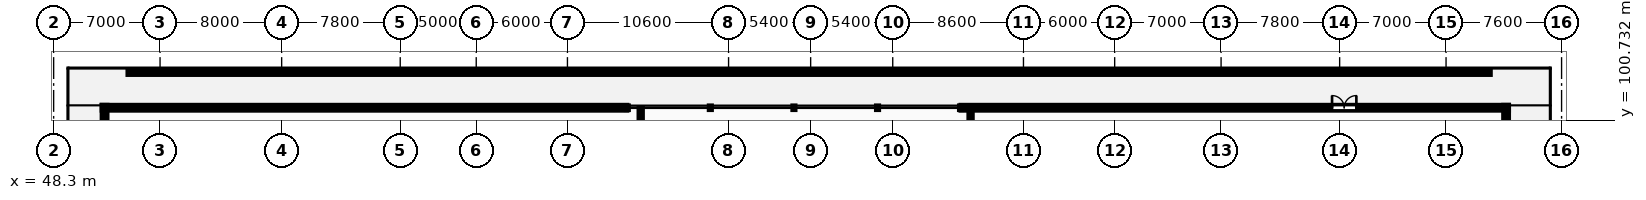
"""IFC4 building model, lengths in metres.
Left out: names, types, materials, properties, quantities, classifications, styles, units other than length and angle.
Written with IfcOpenShell. Run it as: python <this file> out.ifc"""

import sys

from ifc_helpers import new_model, si_unit, direction, frame, frame_2d, origin, place, context, subcontext, project, spatial, rectangle, extrude, element, fill, save


model = new_model("IFC4")
c1 = context("Model", 3, precision=1e-05, world=origin(), true_north=direction((0.0, 1.0)))
c2 = subcontext(c1, "Body", "Model", "MODEL_VIEW")
j1 = project(units=[si_unit("LENGTHUNIT", "METRE"), si_unit("PLANEANGLEUNIT", "RADIAN")], contexts=[c1])
p1 = place(None, origin())
s1 = spatial("IfcSite", under=j1, at=p1, CompositionType="ELEMENT")
p2 = place(p1, origin())
s2 = spatial("IfcBuilding", under=s1, at=p2, CompositionType="ELEMENT")
p3 = place(p2, frame((0.0, 0.0, 14.5)))
s3 = spatial("IfcBuildingStorey", under=s2, at=p3, CompositionType="ELEMENT", Elevation=14.5)
p4 = place(p3, frame((144.0, 101.55, 0.0), z_axis=(0.0, 0.0, 1.0), x_axis=(-1.0, 0.0, 0.0)))
e1 = element("IfcWall", 1, at=p4, inside=s3, PredefinedType="STANDARD", context=c2, shape_type="SweptSolid", body=[
    extrude(rectangle(XDim=36.0, YDim=0.3, at=frame_2d((18.0, 0.0))), origin(), (0.0, 0.0, 1.0), 4.18),
])
p5 = place(p4, frame((10.0, 0.0, 0.0)))
e2 = element("IfcOpeningElement", 2, at=p5, cuts=e1, PredefinedType="OPENING", context=c2, shape_type="SweptSolid", body=[
    extrude(rectangle(XDim=1.6, YDim=2.2, at=frame_2d((0.8, 1.1))), frame((0.0, 0.16, 0.0), z_axis=(0.0, -1.0, 0.0), x_axis=(1.0, 0.0, 0.0)), (0.0, 0.0, 1.0), 0.32),
])
p6 = place(p3, frame((86.0, 101.55, 0.0), z_axis=(0.0, 0.0, 1.0), x_axis=(-1.0, 0.0, 0.0)))
e3 = element("IfcWall", 3, at=p6, inside=s3, PredefinedType="STANDARD", context=c2, shape_type="SweptSolid", body=[
    extrude(rectangle(XDim=34.5, YDim=0.3, at=frame_2d((17.25, 0.0))), origin(), (0.0, 0.0, 1.0), 4.18),
])
p7 = place(p3, frame((51.65, 101.7, 0.0), z_axis=(0.0, 0.0, 1.0), x_axis=(0.0, -1.0, 0.0)))
e4 = element("IfcWall", 4, at=p7, inside=s3, PredefinedType="STANDARD", context=c2, shape_type="SweptSolid", body=[
    extrude(rectangle(XDim=119.7, YDim=0.3, at=frame_2d((59.85, 0.0))), origin(), (0.0, 0.0, 1.0), 4.18),
])
p8 = place(p7, frame((12.0, 0.0, 0.0)))
e5 = element("IfcOpeningElement", 5, at=p8, cuts=e4, PredefinedType="OPENING", context=c2, shape_type="SweptSolid", body=[
    extrude(rectangle(XDim=1.6, YDim=2.2, at=frame_2d((0.8, 1.1))), frame((0.0, 0.16, 0.0), z_axis=(0.0, -1.0, 0.0), x_axis=(1.0, 0.0, 0.0)), (0.0, 0.0, 1.0), 0.32),
])
p9 = place(p3, frame((143.85, -18.0, 0.0), z_axis=(0.0, 0.0, 1.0), x_axis=(0.0, 1.0, 0.0)))
e6 = element("IfcWall", 6, at=p9, inside=s3, PredefinedType="STANDARD", context=c2, shape_type="SweptSolid", body=[
    extrude(rectangle(XDim=119.7, YDim=0.3, at=frame_2d((59.85, 0.0))), origin(), (0.0, 0.0, 1.0), 4.18),
])
p10 = place(p9, frame((20.0, 0.0, 0.0)))
e7 = element("IfcOpeningElement", 7, at=p10, cuts=e6, PredefinedType="OPENING", context=c2, shape_type="SweptSolid", body=[
    extrude(rectangle(XDim=1.6, YDim=2.2, at=frame_2d((0.8, 1.1))), frame((0.0, 0.16, 0.0), z_axis=(0.0, -1.0, 0.0), x_axis=(1.0, 0.0, 0.0)), (0.0, 0.0, 1.0), 0.32),
])
p11 = place(p3, frame((142.8, 103.85, 0.0), z_axis=(0.0, 0.0, 1.0), x_axis=(-1.0, 0.0, 0.0)))
e8 = element("IfcWall", 8, at=p11, inside=s3, PredefinedType="PARAPET", context=c2, shape_type="SweptSolid", body=[
    extrude(rectangle(XDim=89.6, YDim=0.2, at=frame_2d((44.8, 0.0))), origin(), (0.0, 0.0, 1.0), 0.65),
])
p12 = place(p3, frame((86.92, 67.4, 0.0), z_axis=(0.0, 0.0, 1.0), x_axis=(0.0, 1.0, 0.0)))
e9 = element("IfcWall", 9, at=p12, inside=s3, PredefinedType="PARTITIONING", context=c2, shape_type="SweptSolid", body=[
    extrude(rectangle(XDim=34.12, YDim=0.2, at=frame_2d((17.06, 0.0))), origin(), (0.0, 0.0, 1.0), 4.18),
])
p13 = place(p12, frame((8.65, 0.0, 0.0)))
e10 = element("IfcOpeningElement", 10, at=p13, cuts=e9, PredefinedType="OPENING", context=c2, shape_type="SweptSolid", body=[
    extrude(rectangle(XDim=1.22, YDim=2.18, at=frame_2d((0.61, 1.09))), frame((0.0, 0.11, 0.0), z_axis=(0.0, -1.0, 0.0), x_axis=(1.0, 0.0, 0.0)), (0.0, 0.0, 1.0), 0.22),
])
p14 = place(p3, frame((108.62, 67.4, 0.0), z_axis=(0.0, 0.0, 1.0), x_axis=(0.0, 1.0, 0.0)))
e11 = element("IfcWall", 11, at=p14, inside=s3, PredefinedType="PARTITIONING", context=c2, shape_type="SweptSolid", body=[
    extrude(rectangle(XDim=34.12, YDim=0.2, at=frame_2d((17.06, 0.0))), origin(), (0.0, 0.0, 1.0), 4.18),
])
p15 = place(p14, frame((9.5, 0.0, 0.0)))
e12 = element("IfcOpeningElement", 12, at=p15, cuts=e11, PredefinedType="OPENING", context=c2, shape_type="SweptSolid", body=[
    extrude(rectangle(XDim=1.22, YDim=2.18, at=frame_2d((0.61, 1.09))), frame((0.0, 0.11, 0.0), z_axis=(0.0, -1.0, 0.0), x_axis=(1.0, 0.0, 0.0)), (0.0, 0.0, 1.0), 0.22),
])
p16 = place(p5, frame((1.6, 0.0, 0.0), z_axis=(0.0, 0.0, 1.0), x_axis=(-1.0, 0.0, 0.0)))
e13 = element("IfcDoor", 13, at=p16, inside=s3, OperationType="DOUBLE_DOOR_SINGLE_SWING", PredefinedType="DOOR", context=c2, shape_type="SweptSolid", body=[
    extrude(rectangle(XDim=1.6, YDim=2.2, at=frame_2d((0.8, 1.1))), frame((0.0, 0.025, 0.0), z_axis=(0.0, -1.0, 0.0), x_axis=(1.0, 0.0, 0.0)), (0.0, 0.0, 1.0), 0.05),
])
fill(e2, e13)
save(model, sys.argv[1])
